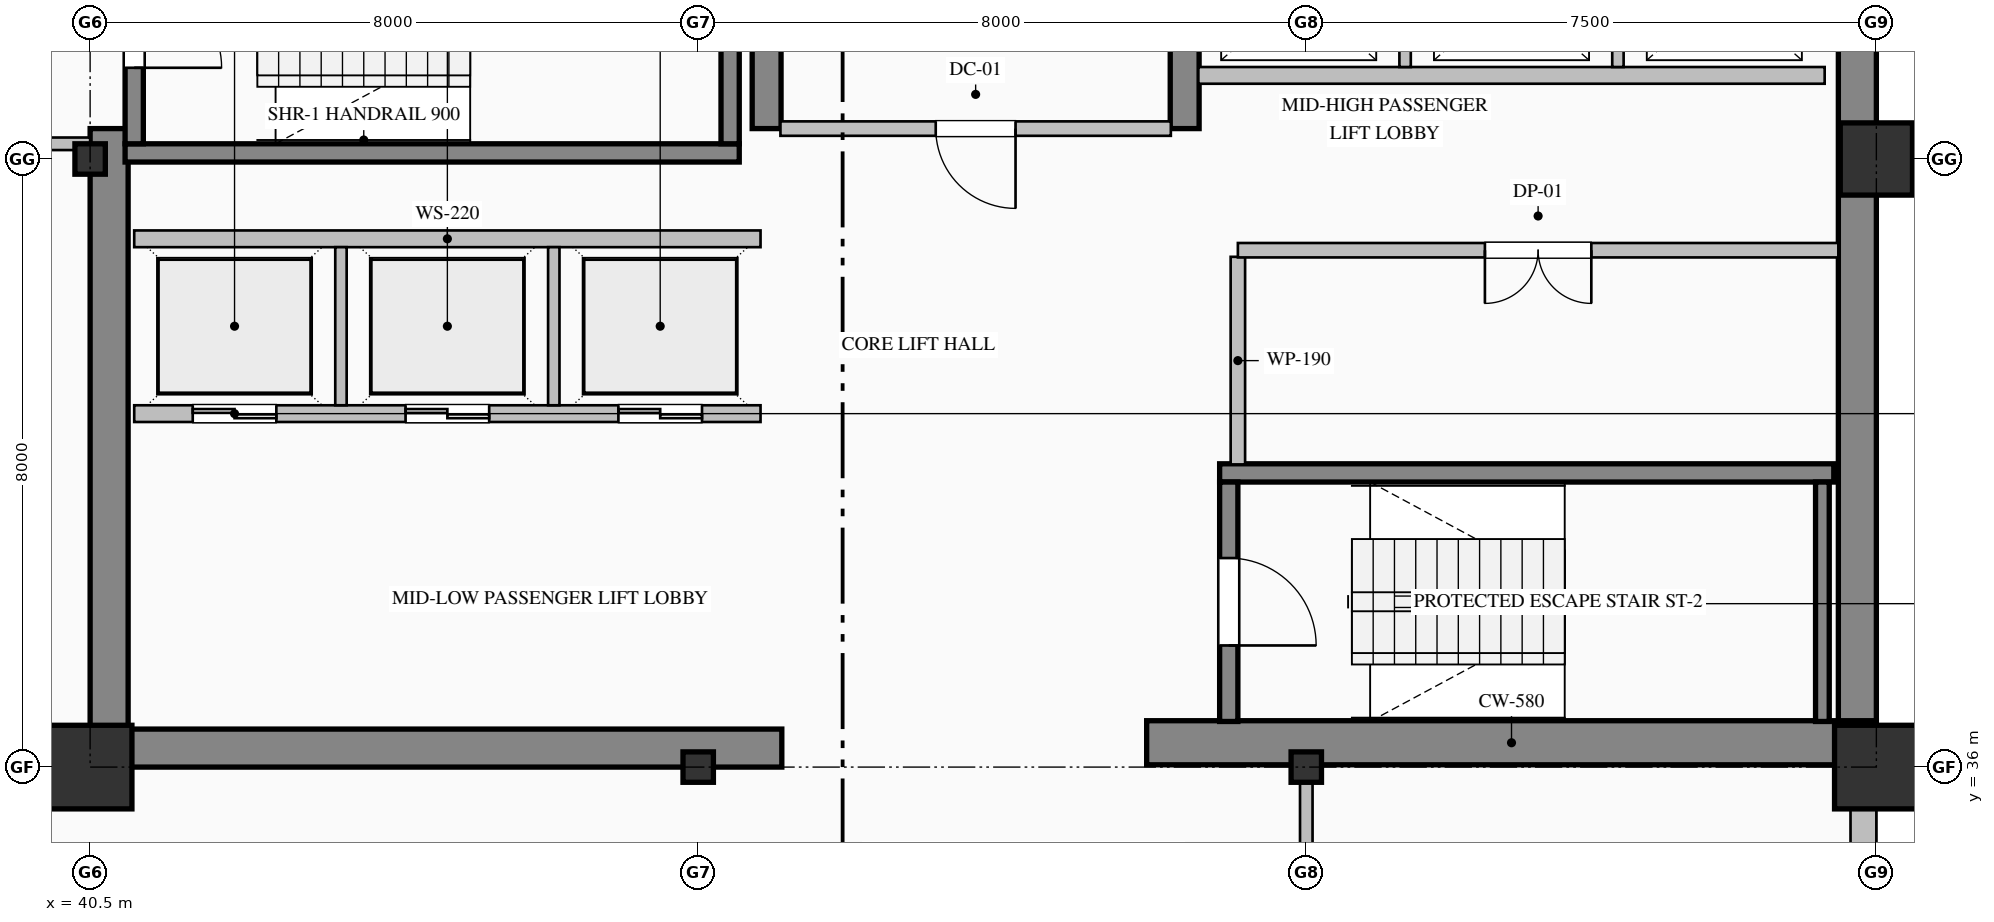
"""IFC4 building model, lengths in metres.
Left out: names, types, materials, properties, quantities, classifications, styles, units other than length and angle.
Written with IfcOpenShell. Run it as: python <this file> out.ifc"""

import sys

from ifc_helpers import new_model, si_unit, direction, frame, frame_2d, origin, origin_2d, place, context, subcontext, project, spatial, rectangle, hollow_rectangle, i_section, extrude, element, fill, save


model = new_model("IFC4")
c1 = context("Model", 3, precision=1e-05, world=origin(), true_north=direction((0.0, 1.0)))
c2 = subcontext(c1, "Body", "Model", "MODEL_VIEW")
j1 = project(units=[si_unit("LENGTHUNIT", "METRE"), si_unit("PLANEANGLEUNIT", "RADIAN")], contexts=[c1])
p1 = place(None, origin())
s1 = spatial("IfcSite", under=j1, at=p1, CompositionType="ELEMENT")
p2 = place(p1, origin())
s2 = spatial("IfcBuilding", under=s1, at=p2, CompositionType="ELEMENT")
p3 = place(p2, frame((0.0, 0.0, 139.0)))
s3 = spatial("IfcBuildingStorey", under=s2, at=p3, CompositionType="ELEMENT", Elevation=139.0)
p4 = place(p3, frame((63.75, 36.32, 0.0), z_axis=(0.0, 0.0, 1.0), x_axis=(0.0, 1.0, 0.0)))
e1 = element("IfcWall", 1, at=p4, inside=s3, PredefinedType="SHEAR", context=c2, shape_type="SweptSolid", body=[
    extrude(rectangle(XDim=15.18, YDim=0.5, at=frame_2d((7.59, 0.0))), origin(), (0.0, 0.0, 1.0), 3.765),
])
p5 = place(p3, frame((40.75, 36.5, 0.0), z_axis=(0.0, 0.0, 1.0), x_axis=(0.0, 1.0, 0.0)))
e2 = element("IfcWall", 2, at=p5, inside=s3, PredefinedType="SHEAR", context=c2, shape_type="SweptSolid", body=[
    extrude(rectangle(XDim=7.9, YDim=0.5, at=frame_2d((3.95, 0.0))), origin(), (0.0, 0.0, 1.0), 3.765),
])
p6 = place(p3, frame((40.5, 36.25, 0.0), z_axis=(0.0, 0.0, 1.0), x_axis=(1.0, 0.0, 0.0)))
e3 = element("IfcWall", 3, at=p6, inside=s3, PredefinedType="SHEAR", context=c2, shape_type="SweptSolid", body=[
    extrude(rectangle(XDim=9.1, YDim=0.5, at=frame_2d((4.55, 0.0))), origin(), (0.0, 0.0, 1.0), 3.765),
])
p7 = place(p3, frame((54.4, 36.32, 0.0), z_axis=(0.0, 0.0, 1.0), x_axis=(1.0, 0.0, 0.0)))
e4 = element("IfcWall", 4, at=p7, inside=s3, PredefinedType="SHEAR", context=c2, shape_type="SweptSolid", body=[
    extrude(rectangle(XDim=9.6, YDim=0.58, at=frame_2d((4.8, 0.0))), origin(), (0.0, 0.0, 1.0), 4.0),
])
p8 = place(p3, frame((49.4, 44.4, 0.0), z_axis=(0.0, 0.0, 1.0), x_axis=(0.0, 1.0, 0.0)))
e5 = element("IfcWall", 5, at=p8, inside=s3, PredefinedType="SHEAR", context=c2, shape_type="SweptSolid", body=[
    extrude(rectangle(XDim=3.0, YDim=0.38, at=frame_2d((1.5, 0.0))), origin(), (0.0, 0.0, 1.0), 3.765),
])
p9 = place(p3, frame((54.9, 44.4, 0.0), z_axis=(0.0, 0.0, 1.0), x_axis=(0.0, 1.0, 0.0)))
e6 = element("IfcWall", 6, at=p9, inside=s3, PredefinedType="SHEAR", context=c2, shape_type="SweptSolid", body=[
    extrude(rectangle(XDim=7.1, YDim=0.38, at=frame_2d((3.55, 0.0))), origin(), (0.0, 0.0, 1.0), 3.765),
])
p10 = place(p3, frame((40.5, 36.0, 0.0), z_axis=(0.0, 0.0, 1.0), x_axis=(1.0, 0.0, 0.0)))
e7 = element("IfcColumn", 7, at=p10, inside=s3, PredefinedType="COLUMN", context=c2, shape_type="SweptSolid", body=[
    extrude(hollow_rectangle(XDim=1.1, YDim=1.1, WallThickness=0.04, at=origin_2d()), origin(), (0.0, 0.0, 1.0), 4.0),
])
for number, where, z_axis, x_axis in (
    (8, (40.5, 44.0, 0.0), (0.0, 0.0, 1.0), (1.0, 0.0, 0.0)),
    (9, (48.5, 36.0, 0.0), (0.0, 0.0, 1.0), (1.0, 0.0, 0.0)),
    (10, (56.5, 36.0, 0.0), (0.0, 0.0, 1.0), (1.0, 0.0, 0.0)),
):
    element("IfcColumn", number, at=place(p3, frame(where, z_axis=z_axis, x_axis=x_axis)), inside=s3, PredefinedType="COLUMN", context=c2, shape_type="SweptSolid", body=[
        extrude(i_section(OverallWidth=0.4, OverallDepth=0.4, WebThickness=0.013, FlangeThickness=0.021, FilletRadius=0.022, at=origin_2d()), origin(), (0.0, 0.0, 1.0), 4.0),
    ])
p11 = place(p3, frame((64.0, 36.0, 0.0), z_axis=(0.0, 0.0, 1.0), x_axis=(1.0, 0.0, 0.0)))
e11 = element("IfcColumn", 11, at=p11, inside=s3, PredefinedType="COLUMN", context=c2, shape_type="SweptSolid", body=[
    extrude(hollow_rectangle(XDim=1.1, YDim=1.1, WallThickness=0.04, at=origin_2d()), origin(), (0.0, 0.0, 1.0), 4.0),
])
p12 = place(p3, frame((64.0, 44.0, 0.0), z_axis=(0.0, 0.0, 1.0), x_axis=(1.0, 0.0, 0.0)))
e12 = element("IfcColumn", 12, at=p12, inside=s3, PredefinedType="COLUMN", context=c2, shape_type="SweptSolid", body=[
    extrude(hollow_rectangle(XDim=0.95, YDim=0.95, WallThickness=0.036, at=origin_2d()), origin(), (0.0, 0.0, 1.0), 4.0),
])
p13 = place(p3, frame((63.83, 36.05, 0.0), z_axis=(0.0, 0.0, 1.0), x_axis=(0.0, -1.0, 0.0)))
e13 = element("IfcWall", 13, at=p13, inside=s3, PredefinedType="SOLIDWALL", context=c2, shape_type="SweptSolid", body=[
    extrude(rectangle(XDim=28.05, YDim=0.34, at=frame_2d((14.025, 0.0))), origin(), (0.0, 0.0, 1.0), 3.265),
])
p14 = place(p13, frame((2.85, 0.0, 0.85)))
e14 = element("IfcOpeningElement", 14, at=p14, cuts=e13, PredefinedType="OPENING", context=c2, shape_type="SweptSolid", body=[
    extrude(rectangle(XDim=1.5, YDim=1.95, at=frame_2d((0.75, 0.975))), frame((0.0, 0.18, 0.0), z_axis=(0.0, -1.0, 0.0), x_axis=(1.0, 0.0, 0.0)), (0.0, 0.0, 1.0), 0.36),
])
p15 = place(p13, frame((10.2, 0.0, 0.7)))
e15 = element("IfcOpeningElement", 15, at=p15, cuts=e13, PredefinedType="OPENING", context=c2, shape_type="SweptSolid", body=[
    extrude(rectangle(XDim=1.2, YDim=1.85, at=frame_2d((0.6, 0.925))), frame((0.0, 0.18, 0.0), z_axis=(0.0, -1.0, 0.0), x_axis=(1.0, 0.0, 0.0)), (0.0, 0.0, 1.0), 0.36),
])
p16 = place(p13, frame((13.65, 0.0, 0.85)))
e16 = element("IfcOpeningElement", 16, at=p16, cuts=e13, PredefinedType="OPENING", context=c2, shape_type="SweptSolid", body=[
    extrude(rectangle(XDim=1.5, YDim=1.95, at=frame_2d((0.75, 0.975))), frame((0.0, 0.18, 0.0), z_axis=(0.0, -1.0, 0.0), x_axis=(1.0, 0.0, 0.0)), (0.0, 0.0, 1.0), 0.36),
])
p17 = place(p13, frame((24.45, 0.0, 0.85)))
e17 = element("IfcOpeningElement", 17, at=p17, cuts=e13, PredefinedType="OPENING", context=c2, shape_type="SweptSolid", body=[
    extrude(rectangle(XDim=1.5, YDim=1.95, at=frame_2d((0.75, 0.975))), frame((0.0, 0.18, 0.0), z_axis=(0.0, -1.0, 0.0), x_axis=(1.0, 0.0, 0.0)), (0.0, 0.0, 1.0), 0.36),
])
p18 = place(p3, frame((49.04, 44.08, 0.0), z_axis=(0.0, 0.0, 1.0), x_axis=(-1.0, 0.0, 0.0)))
e18 = element("IfcWall", 18, at=p18, inside=s3, PredefinedType="SOLIDWALL", context=c2, shape_type="SweptSolid", body=[
    extrude(rectangle(XDim=8.08, YDim=0.24, at=frame_2d((4.04, 0.0))), origin(), (0.0, 0.0, 1.0), 4.0),
])
p19 = place(p3, frame((41.08, 47.35, 0.0), z_axis=(0.0, 0.0, 1.0), x_axis=(0.0, -1.0, 0.0)))
e19 = element("IfcWall", 19, at=p19, inside=s3, PredefinedType="SOLIDWALL", context=c2, shape_type="SweptSolid", body=[
    extrude(rectangle(XDim=3.15, YDim=0.24, at=frame_2d((1.575, 0.0))), origin(), (0.0, 0.0, 1.0), 4.0),
])
p20 = place(p19, frame((1.0, 0.0, 0.0)))
e20 = element("IfcOpeningElement", 20, at=p20, cuts=e19, PredefinedType="OPENING", context=c2, shape_type="SweptSolid", body=[
    extrude(rectangle(XDim=1.15, YDim=2.2, at=frame_2d((0.575, 1.1))), frame((0.0, 0.13, 0.0), z_axis=(0.0, -1.0, 0.0), x_axis=(1.0, 0.0, 0.0)), (0.0, 0.0, 1.0), 0.26),
])
p21 = place(p3, frame((48.92, 44.2, 0.0), z_axis=(0.0, 0.0, 1.0), x_axis=(0.0, 1.0, 0.0)))
e21 = element("IfcWall", 21, at=p21, inside=s3, PredefinedType="SOLIDWALL", context=c2, shape_type="SweptSolid", body=[
    extrude(rectangle(XDim=3.15, YDim=0.24, at=frame_2d((1.575, 0.0))), origin(), (0.0, 0.0, 1.0), 4.0),
])
p22 = place(p3, frame((55.36, 39.87, 0.0), z_axis=(0.0, 0.0, 1.0), x_axis=(1.0, 0.0, 0.0)))
e22 = element("IfcWall", 22, at=p22, inside=s3, PredefinedType="SOLIDWALL", context=c2, shape_type="SweptSolid", body=[
    extrude(rectangle(XDim=8.08, YDim=0.24, at=frame_2d((4.04, 0.0))), origin(), (0.0, 0.0, 1.0), 4.0),
])
p23 = place(p3, frame((55.48, 39.75, 0.0), z_axis=(0.0, 0.0, 1.0), x_axis=(0.0, -1.0, 0.0)))
e23 = element("IfcWall", 23, at=p23, inside=s3, PredefinedType="SOLIDWALL", context=c2, shape_type="SweptSolid", body=[
    extrude(rectangle(XDim=3.15, YDim=0.24, at=frame_2d((1.575, 0.0))), origin(), (0.0, 0.0, 1.0), 4.0),
])
p24 = place(p23, frame((1.0, 0.0, 0.0)))
e24 = element("IfcOpeningElement", 24, at=p24, cuts=e23, PredefinedType="OPENING", context=c2, shape_type="SweptSolid", body=[
    extrude(rectangle(XDim=1.15, YDim=2.2, at=frame_2d((0.575, 1.1))), frame((0.0, 0.13, 0.0), z_axis=(0.0, -1.0, 0.0), x_axis=(1.0, 0.0, 0.0)), (0.0, 0.0, 1.0), 0.26),
])
p25 = place(p3, frame((63.29, 36.6, 0.0), z_axis=(0.0, 0.0, 1.0), x_axis=(0.0, 1.0, 0.0)))
e25 = element("IfcWall", 25, at=p25, inside=s3, PredefinedType="SOLIDWALL", context=c2, shape_type="SweptSolid", body=[
    extrude(rectangle(XDim=3.15, YDim=0.18, at=frame_2d((1.575, 0.0))), origin(), (0.0, 0.0, 1.0), 4.0),
])
p26 = place(p3, frame((49.32, 40.65, 0.0), z_axis=(0.0, 0.0, 1.0), x_axis=(-1.0, 0.0, 0.0)))
e26 = element("IfcWall", 26, at=p26, inside=s3, PredefinedType="PARTITIONING", context=c2, shape_type="SweptSolid", body=[
    extrude(rectangle(XDim=8.24, YDim=0.22, at=frame_2d((4.12, 0.0))), origin(), (0.0, 0.0, 1.0), 3.765),
])
p27 = place(p26, frame((6.37, 0.0, 0.0)))
e27 = element("IfcOpeningElement", 27, at=p27, cuts=e26, PredefinedType="OPENING", context=c2, shape_type="SweptSolid", body=[
    extrude(rectangle(XDim=1.1, YDim=2.2, at=frame_2d((0.55, 1.1))), frame((0.0, 0.12, 0.0), z_axis=(0.0, -1.0, 0.0), x_axis=(1.0, 0.0, 0.0)), (0.0, 0.0, 1.0), 0.24),
])
p28 = place(p26, frame((3.57, 0.0, 0.0)))
e28 = element("IfcOpeningElement", 28, at=p28, cuts=e26, PredefinedType="OPENING", context=c2, shape_type="SweptSolid", body=[
    extrude(rectangle(XDim=1.1, YDim=2.2, at=frame_2d((0.55, 1.1))), frame((0.0, 0.12, 0.0), z_axis=(0.0, -1.0, 0.0), x_axis=(1.0, 0.0, 0.0)), (0.0, 0.0, 1.0), 0.24),
])
p29 = place(p26, frame((0.77, 0.0, 0.0)))
e29 = element("IfcOpeningElement", 29, at=p29, cuts=e26, PredefinedType="OPENING", context=c2, shape_type="SweptSolid", body=[
    extrude(rectangle(XDim=1.1, YDim=2.2, at=frame_2d((0.55, 1.1))), frame((0.0, 0.12, 0.0), z_axis=(0.0, -1.0, 0.0), x_axis=(1.0, 0.0, 0.0)), (0.0, 0.0, 1.0), 0.24),
])
p30 = place(p3, frame((41.08, 42.95, 0.0), z_axis=(0.0, 0.0, 1.0), x_axis=(1.0, 0.0, 0.0)))
e30 = element("IfcWall", 30, at=p30, inside=s3, PredefinedType="PARTITIONING", context=c2, shape_type="SweptSolid", body=[
    extrude(rectangle(XDim=8.24, YDim=0.22, at=frame_2d((4.12, 0.0))), origin(), (0.0, 0.0, 1.0), 3.765),
])
for number, where, z_axis, x_axis in (
    (31, (43.8, 40.76, 0.0), (0.0, 0.0, 1.0), (0.0, 1.0, 0.0)),
    (32, (46.6, 40.76, 0.0), (0.0, 0.0, 1.0), (0.0, 1.0, 0.0)),
):
    element("IfcWall", number, at=place(p3, frame(where, z_axis=z_axis, x_axis=x_axis)), inside=s3, PredefinedType="PARTITIONING", context=c2, shape_type="SweptSolid", body=[
        extrude(rectangle(XDim=2.08, YDim=0.15, at=frame_2d((1.04, 0.0))), origin(), (0.0, 0.0, 1.0), 3.765),
    ])
p31 = place(p3, frame((63.32, 45.1, 0.0), z_axis=(0.0, 0.0, 1.0), x_axis=(-1.0, 0.0, 0.0)))
e33 = element("IfcWall", 33, at=p31, inside=s3, PredefinedType="PARTITIONING", context=c2, shape_type="SweptSolid", body=[
    extrude(rectangle(XDim=8.24, YDim=0.22, at=frame_2d((4.12, 0.0))), origin(), (0.0, 0.0, 1.0), 3.765),
])
for number, where, z_axis, x_axis in (
    (34, (57.8, 45.21, 0.0), (0.0, 0.0, 1.0), (0.0, 1.0, 0.0)),
    (35, (60.6, 45.21, 0.0), (0.0, 0.0, 1.0), (0.0, 1.0, 0.0)),
):
    element("IfcWall", number, at=place(p3, frame(where, z_axis=z_axis, x_axis=x_axis)), inside=s3, PredefinedType="PARTITIONING", context=c2, shape_type="SweptSolid", body=[
        extrude(rectangle(XDim=2.03, YDim=0.15, at=frame_2d((1.015, 0.0))), origin(), (0.0, 0.0, 1.0), 3.765),
    ])
p32 = place(p3, frame((40.5, 44.2, 0.0), z_axis=(0.0, 0.0, 1.0), x_axis=(-1.0, 0.0, 0.0)))
e36 = element("IfcWall", 36, at=p32, inside=s3, PredefinedType="PARTITIONING", context=c2, shape_type="SweptSolid", body=[
    extrude(rectangle(XDim=2.7, YDim=0.165, at=frame_2d((1.35, 0.0))), origin(), (0.0, 0.0, 1.0), 3.765),
])
p33 = place(p32, frame((0.825, 0.0, 0.0)))
e37 = element("IfcOpeningElement", 37, at=p33, cuts=e36, PredefinedType="OPENING", context=c2, shape_type="SweptSolid", body=[
    extrude(rectangle(XDim=1.05, YDim=2.15, at=frame_2d((0.525, 1.075))), frame((0.0, 0.093, 0.0), z_axis=(0.0, -1.0, 0.0), x_axis=(1.0, 0.0, 0.0)), (0.0, 0.0, 1.0), 0.185),
])
p34 = place(p3, frame((54.718, 44.4, 0.0), z_axis=(0.0, 0.0, 1.0), x_axis=(-1.0, 0.0, 0.0)))
e38 = element("IfcWall", 38, at=p34, inside=s3, PredefinedType="PARTITIONING", context=c2, shape_type="SweptSolid", body=[
    extrude(rectangle(XDim=5.136, YDim=0.19, at=frame_2d((2.568, 0.0))), origin(), (0.0, 0.0, 1.0), 3.765),
])
p35 = place(p34, frame((2.043, 0.0, 0.0)))
e39 = element("IfcOpeningElement", 39, at=p35, cuts=e38, PredefinedType="OPENING", context=c2, shape_type="SweptSolid", body=[
    extrude(rectangle(XDim=1.05, YDim=2.15, at=frame_2d((0.525, 1.075))), frame((0.0, 0.105, 0.0), z_axis=(0.0, -1.0, 0.0), x_axis=(1.0, 0.0, 0.0)), (0.0, 0.0, 1.0), 0.21),
])
p36 = place(p3, frame((55.6, 42.713, 0.0), z_axis=(0.0, 0.0, 1.0), x_axis=(0.0, -1.0, 0.0)))
e40 = element("IfcWall", 40, at=p36, inside=s3, PredefinedType="PARTITIONING", context=c2, shape_type="SweptSolid", body=[
    extrude(rectangle(XDim=2.731, YDim=0.19, at=frame_2d((1.365, 0.0))), origin(), (0.0, 0.0, 1.0), 3.765),
])
p37 = place(p3, frame((63.5, 42.8, 0.0), z_axis=(0.0, 0.0, 1.0), x_axis=(-1.0, 0.0, 0.0)))
e41 = element("IfcWall", 41, at=p37, inside=s3, PredefinedType="PARTITIONING", context=c2, shape_type="SweptSolid", body=[
    extrude(rectangle(XDim=7.9, YDim=0.19, at=frame_2d((3.95, 0.0))), origin(), (0.0, 0.0, 1.0), 3.765),
])
p38 = place(p37, frame((3.25, 0.0, 0.0)))
e42 = element("IfcOpeningElement", 42, at=p38, cuts=e41, PredefinedType="OPENING", context=c2, shape_type="SweptSolid", body=[
    extrude(rectangle(XDim=1.4, YDim=2.25, at=frame_2d((0.7, 1.125))), frame((0.0, 0.105, 0.0), z_axis=(0.0, -1.0, 0.0), x_axis=(1.0, 0.0, 0.0)), (0.0, 0.0, 1.0), 0.21),
])
p39 = place(p3, frame((56.5, 36.0, 0.0), z_axis=(0.0, 0.0, 1.0), x_axis=(0.0, -1.0, 0.0)))
e43 = element("IfcWall", 43, at=p39, inside=s3, PredefinedType="PARTITIONING", context=c2, shape_type="SweptSolid", body=[
    extrude(rectangle(XDim=2.325, YDim=0.165, at=frame_2d((1.163, 0.0))), origin(), (0.0, 0.0, 1.0), 3.157),
])
p40 = place(p20, origin())
e44 = element("IfcDoor", 44, at=p40, inside=s3, OperationType="SINGLE_SWING_RIGHT", PredefinedType="DOOR", context=c2, shape_type="SweptSolid", body=[
    extrude(rectangle(XDim=1.15, YDim=2.2, at=frame_2d((0.575, 1.1))), frame((0.0, 0.025, 0.0), z_axis=(0.0, -1.0, 0.0), x_axis=(1.0, 0.0, 0.0)), (0.0, 0.0, 1.0), 0.05),
])
fill(e20, e44)
p41 = place(p24, origin())
e45 = element("IfcDoor", 45, at=p41, inside=s3, OperationType="SINGLE_SWING_RIGHT", PredefinedType="DOOR", context=c2, shape_type="SweptSolid", body=[
    extrude(rectangle(XDim=1.15, YDim=2.2, at=frame_2d((0.575, 1.1))), frame((0.0, 0.025, 0.0), z_axis=(0.0, -1.0, 0.0), x_axis=(1.0, 0.0, 0.0)), (0.0, 0.0, 1.0), 0.05),
])
fill(e24, e45)
p42 = place(p27, origin())
e46 = element("IfcDoor", 46, at=p42, inside=s3, OperationType="DOUBLE_DOOR_SLIDING", PredefinedType="DOOR", context=c2, shape_type="SweptSolid", body=[
    extrude(rectangle(XDim=1.1, YDim=2.2, at=frame_2d((0.55, 1.1))), frame((0.0, 0.025, 0.0), z_axis=(0.0, -1.0, 0.0), x_axis=(1.0, 0.0, 0.0)), (0.0, 0.0, 1.0), 0.05),
])
fill(e27, e46)
p43 = place(p28, origin())
e47 = element("IfcDoor", 47, at=p43, inside=s3, OperationType="DOUBLE_DOOR_SLIDING", PredefinedType="DOOR", context=c2, shape_type="SweptSolid", body=[
    extrude(rectangle(XDim=1.1, YDim=2.2, at=frame_2d((0.55, 1.1))), frame((0.0, 0.025, 0.0), z_axis=(0.0, -1.0, 0.0), x_axis=(1.0, 0.0, 0.0)), (0.0, 0.0, 1.0), 0.05),
])
fill(e28, e47)
p44 = place(p29, origin())
e48 = element("IfcDoor", 48, at=p44, inside=s3, OperationType="DOUBLE_DOOR_SLIDING", PredefinedType="DOOR", context=c2, shape_type="SweptSolid", body=[
    extrude(rectangle(XDim=1.1, YDim=2.2, at=frame_2d((0.55, 1.1))), frame((0.0, 0.025, 0.0), z_axis=(0.0, -1.0, 0.0), x_axis=(1.0, 0.0, 0.0)), (0.0, 0.0, 1.0), 0.05),
])
fill(e29, e48)
p45 = place(p35, origin())
e49 = element("IfcDoor", 49, at=p45, inside=s3, OperationType="SINGLE_SWING_LEFT", PredefinedType="DOOR", context=c2, shape_type="SweptSolid", body=[
    extrude(rectangle(XDim=1.05, YDim=2.15, at=frame_2d((0.525, 1.075))), frame((0.0, 0.025, 0.0), z_axis=(0.0, -1.0, 0.0), x_axis=(1.0, 0.0, 0.0)), (0.0, 0.0, 1.0), 0.05),
])
fill(e39, e49)
p46 = place(p38, origin())
e50 = element("IfcDoor", 50, at=p46, inside=s3, OperationType="DOUBLE_DOOR_SINGLE_SWING", PredefinedType="DOOR", context=c2, shape_type="SweptSolid", body=[
    extrude(rectangle(XDim=1.4, YDim=2.25, at=frame_2d((0.7, 1.125))), frame((0.0, 0.025, 0.0), z_axis=(0.0, -1.0, 0.0), x_axis=(1.0, 0.0, 0.0)), (0.0, 0.0, 1.0), 0.05),
])
fill(e42, e50)
save(model, sys.argv[1])
